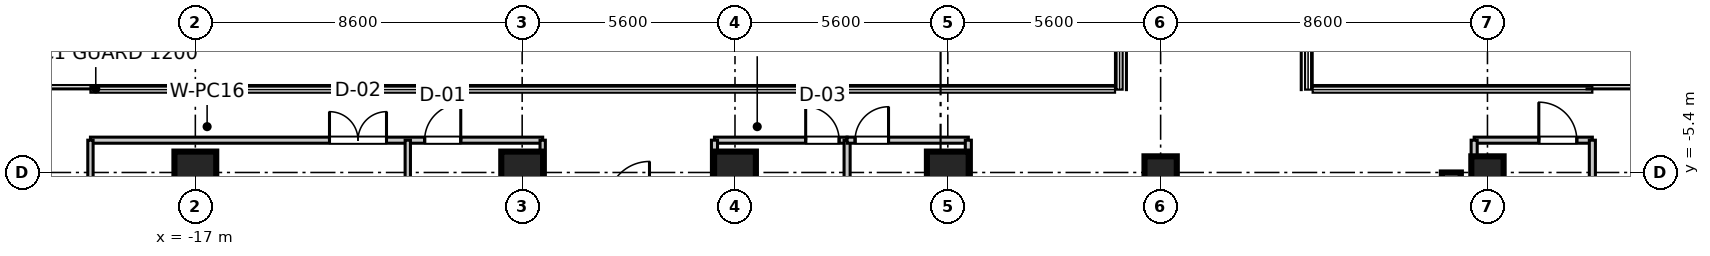
"""IFC4 building model, lengths in metres.
Left out: names, types, materials, properties, quantities, classifications, styles, units other than length and angle.
Written with IfcOpenShell. Run it as: python <this file> out.ifc"""

import sys

from ifc_helpers import new_model, si_unit, direction, frame, frame_2d, origin, origin_2d, place, context, subcontext, project, spatial, rectangle, extrude, source, transform, mapped, element, fill, save


model = new_model("IFC4")
c1 = context("Model", 3, precision=1e-05, world=origin(), true_north=direction((0.0, 1.0)))
c2 = subcontext(c1, "Body", "Model", "MODEL_VIEW")
j1 = project(units=[si_unit("LENGTHUNIT", "METRE"), si_unit("PLANEANGLEUNIT", "RADIAN")], contexts=[c1])
p1 = place(None, origin())
s1 = spatial("IfcSite", under=j1, at=p1, CompositionType="ELEMENT")
p2 = place(p1, origin())
s2 = spatial("IfcBuilding", under=s1, at=p2, CompositionType="ELEMENT")
p3 = place(p2, frame((0.0, 0.0, 178.2)))
s3 = spatial("IfcBuildingStorey", under=s2, at=p3, CompositionType="ELEMENT", Elevation=178.2)
m1 = source(origin(), c2, "Body", "SweptSolid", [
    extrude(rectangle(XDim=1.1, YDim=1.1, at=origin_2d()), origin(), (0.0, 0.0, 1.0), 3.605),
])
for number, where, z_axis, x_axis in (
    (1, (-17.0, -5.4, 0.0), (0.0, 0.0, 1.0), (1.0, 0.0, 0.0)),
    (2, (-8.4, -5.4, 0.0), (0.0, 0.0, 1.0), (1.0, 0.0, 0.0)),
    (3, (-2.8, -5.4, 0.0), (0.0, 0.0, 1.0), (1.0, 0.0, 0.0)),
    (4, (2.8, -5.4, 0.0), (0.0, 0.0, 1.0), (1.0, 0.0, 0.0)),
):
    element("IfcColumn", number, at=place(p3, frame(where, z_axis=z_axis, x_axis=x_axis)), inside=s3, PredefinedType="COLUMN", context=c2, shape_type="MappedRepresentation", body=[
        mapped(m1, transform((0.0, 0.0, 0.0), scale=1.0)),
    ])
m2 = source(origin(), c2, "Body", "SweptSolid", [
    extrude(rectangle(XDim=0.85, YDim=0.85, at=origin_2d()), origin(), (0.0, 0.0, 1.0), 3.605),
])
for number, where, z_axis, x_axis in (
    (5, (8.4, -5.4, 0.0), (0.0, 0.0, 1.0), (1.0, 0.0, 0.0)),
    (6, (17.0, -5.4, 0.0), (0.0, 0.0, 1.0), (1.0, 0.0, 0.0)),
):
    element("IfcColumn", number, at=place(p3, frame(where, z_axis=z_axis, x_axis=x_axis)), inside=s3, PredefinedType="PILASTER", context=c2, shape_type="MappedRepresentation", body=[
        mapped(m2, transform((0.0, 0.0, 0.0), scale=1.0)),
    ])
m3 = source(origin(), c2, "Body", "SweptSolid", [
    extrude(rectangle(XDim=11.6, YDim=0.5, at=frame_2d((5.8, 0.0))), origin(), (0.0, 0.0, 1.0), 3.39),
])
p4 = place(p3, frame((16.05, -17.0, 0.0), z_axis=(0.0, 0.0, 1.0), x_axis=(0.0, 1.0, 0.0)))
e7 = element("IfcWall", 7, at=p4, inside=s3, PredefinedType="SHEAR", context=c2, shape_type="MappedRepresentation", body=[
    mapped(m3, transform((0.0, 0.0, 0.0), scale=1.0)),
])
m4 = source(origin(), c2, "Body", "SweptSolid", [
    extrude(rectangle(XDim=3.11, YDim=0.16, at=frame_2d((1.555, 0.0))), origin(), (0.0, 0.0, 1.0), 2.73),
])
p5 = place(p3, frame((16.65, -4.55, 0.0), z_axis=(0.0, 0.0, 1.0), x_axis=(1.0, 0.0, 0.0)))
e8 = element("IfcWall", 8, at=p5, inside=s3, PredefinedType="PARTITIONING", context=c2, shape_type="MappedRepresentation", body=[
    mapped(m4, transform((0.0, 0.0, 0.0), scale=1.0)),
])
p6 = place(p5, frame((1.701, 0.0, 0.0)))
e9 = element("IfcOpeningElement", 9, at=p6, cuts=e8, PredefinedType="OPENING", context=c2, shape_type="SweptSolid", body=[
    extrude(rectangle(XDim=1.0, YDim=2.1, at=frame_2d((0.5, 1.05))), frame((0.0, 0.09, 0.0), z_axis=(0.0, -1.0, 0.0), x_axis=(1.0, 0.0, 0.0)), (0.0, 0.0, 1.0), 0.18),
])
m5 = source(origin(), c2, "Body", "SweptSolid", [
    extrude(rectangle(XDim=17.95, YDim=0.16, at=frame_2d((8.975, 0.0))), origin(), (0.0, 0.0, 1.0), 2.73),
])
p7 = place(p3, frame((16.65, -22.5, 0.0), z_axis=(0.0, 0.0, 1.0), x_axis=(0.0, 1.0, 0.0)))
e10 = element("IfcWall", 10, at=p7, inside=s3, PredefinedType="PARTITIONING", context=c2, shape_type="MappedRepresentation", body=[
    mapped(m5, transform((0.0, 0.0, 0.0), scale=1.0)),
])
m6 = source(origin(), c2, "Body", "SweptSolid", [
    extrude(rectangle(XDim=16.53, YDim=0.16, at=frame_2d((8.265, 0.0))), origin(), (0.0, 0.0, 1.0), 2.73),
])
p8 = place(p3, frame((19.76, -21.08, 0.0), z_axis=(0.0, 0.0, 1.0), x_axis=(0.0, 1.0, 0.0)))
e11 = element("IfcWall", 11, at=p8, inside=s3, PredefinedType="PARTITIONING", context=c2, shape_type="MappedRepresentation", body=[
    mapped(m6, transform((0.0, 0.0, 0.0), scale=1.0)),
])
m7 = source(origin(), c2, "Body", "SweptSolid", [
    extrude(rectangle(XDim=11.9, YDim=0.16, at=frame_2d((5.95, 0.0))), origin(), (0.0, 0.0, 1.0), 2.73),
])
p9 = place(p3, frame((-19.76, -4.55, 0.0), z_axis=(0.0, 0.0, 1.0), x_axis=(1.0, 0.0, 0.0)))
e12 = element("IfcWall", 12, at=p9, inside=s3, PredefinedType="PARTITIONING", context=c2, shape_type="MappedRepresentation", body=[
    mapped(m7, transform((0.0, 0.0, 0.0), scale=1.0)),
])
p10 = place(p9, frame((6.29, 0.0, 0.0)))
e13 = element("IfcOpeningElement", 13, at=p10, cuts=e12, PredefinedType="OPENING", context=c2, shape_type="SweptSolid", body=[
    extrude(rectangle(XDim=1.5, YDim=2.15, at=frame_2d((0.75, 1.075))), frame((0.0, 0.09, 0.0), z_axis=(0.0, -1.0, 0.0), x_axis=(1.0, 0.0, 0.0)), (0.0, 0.0, 1.0), 0.18),
])
p11 = place(p9, frame((8.794, 0.0, 0.0)))
e14 = element("IfcOpeningElement", 14, at=p11, cuts=e12, PredefinedType="OPENING", context=c2, shape_type="SweptSolid", body=[
    extrude(rectangle(XDim=0.95, YDim=2.1, at=frame_2d((0.475, 1.05))), frame((0.0, 0.09, 0.0), z_axis=(0.0, -1.0, 0.0), x_axis=(1.0, 0.0, 0.0)), (0.0, 0.0, 1.0), 0.18),
])
m8 = source(origin(), c2, "Body", "SweptSolid", [
    extrude(rectangle(XDim=16.53, YDim=0.14, at=frame_2d((8.265, 0.0))), origin(), (0.0, 0.0, 1.0), 2.73),
])
p12 = place(p3, frame((-19.76, -21.08, 0.0), z_axis=(0.0, 0.0, 1.0), x_axis=(0.0, 1.0, 0.0)))
e15 = element("IfcWall", 15, at=p12, inside=s3, PredefinedType="PARTITIONING", context=c2, shape_type="MappedRepresentation", body=[
    mapped(m8, transform((0.0, 0.0, 0.0), scale=1.0)),
])
m9 = source(origin(), c2, "Body", "SweptSolid", [
    extrude(rectangle(XDim=17.95, YDim=0.14, at=frame_2d((8.975, 0.0))), origin(), (0.0, 0.0, 1.0), 2.73),
])
for number, where, z_axis, x_axis in (
    (16, (-7.86, -22.5, 0.0), (0.0, 0.0, 1.0), (0.0, 1.0, 0.0)),
    (17, (-11.41, -22.5, 0.0), (0.0, 0.0, 1.0), (0.0, 1.0, 0.0)),
):
    element("IfcWall", number, at=place(p3, frame(where, z_axis=z_axis, x_axis=x_axis)), inside=s3, PredefinedType="PARTITIONING", context=c2, shape_type="MappedRepresentation", body=[
        mapped(m9, transform((0.0, 0.0, 0.0), scale=1.0)),
    ])
m10 = source(origin(), c2, "Body", "SweptSolid", [
    extrude(rectangle(XDim=3.49, YDim=0.16, at=frame_2d((1.745, 0.0))), origin(), (0.0, 0.0, 1.0), 2.73),
])
p13 = place(p3, frame((-3.34, -4.55, 0.0), z_axis=(0.0, 0.0, 1.0), x_axis=(1.0, 0.0, 0.0)))
e18 = element("IfcWall", 18, at=p13, inside=s3, PredefinedType="PARTITIONING", context=c2, shape_type="MappedRepresentation", body=[
    mapped(m10, transform((0.0, 0.0, 0.0), scale=1.0)),
])
p14 = place(p13, frame((2.4, 0.0, 0.0)))
e19 = element("IfcOpeningElement", 19, at=p14, cuts=e18, PredefinedType="OPENING", context=c2, shape_type="SweptSolid", body=[
    extrude(rectangle(XDim=0.88, YDim=2.1, at=frame_2d((0.44, 1.05))), frame((0.0, 0.09, 0.0), z_axis=(0.0, -1.0, 0.0), x_axis=(1.0, 0.0, 0.0)), (0.0, 0.0, 1.0), 0.18),
])
for number, where, z_axis, x_axis in (
    (20, (-3.34, -22.5, 0.0), (0.0, 0.0, 1.0), (0.0, 1.0, 0.0)),
    (21, (0.15, -22.5, 0.0), (0.0, 0.0, 1.0), (0.0, 1.0, 0.0)),
):
    element("IfcWall", number, at=place(p3, frame(where, z_axis=z_axis, x_axis=x_axis)), inside=s3, PredefinedType="PARTITIONING", context=c2, shape_type="MappedRepresentation", body=[
        mapped(m5, transform((0.0, 0.0, 0.0), scale=1.0)),
    ])
m11 = source(origin(), c2, "Body", "SweptSolid", [
    extrude(rectangle(XDim=3.19, YDim=0.16, at=frame_2d((1.595, 0.0))), origin(), (0.0, 0.0, 1.0), 2.73),
])
p15 = place(p3, frame((0.15, -4.55, 0.0), z_axis=(0.0, 0.0, 1.0), x_axis=(1.0, 0.0, 0.0)))
e22 = element("IfcWall", 22, at=p15, inside=s3, PredefinedType="PARTITIONING", context=c2, shape_type="MappedRepresentation", body=[
    mapped(m11, transform((0.0, 0.0, 0.0), scale=1.0)),
])
p16 = place(p15, frame((0.21, 0.0, 0.0)))
e23 = element("IfcOpeningElement", 23, at=p16, cuts=e22, PredefinedType="OPENING", context=c2, shape_type="SweptSolid", body=[
    extrude(rectangle(XDim=0.88, YDim=2.1, at=frame_2d((0.44, 1.05))), frame((0.0, 0.09, 0.0), z_axis=(0.0, -1.0, 0.0), x_axis=(1.0, 0.0, 0.0)), (0.0, 0.0, 1.0), 0.18),
])
p17 = place(p3, frame((3.34, -22.5, 0.0), z_axis=(0.0, 0.0, 1.0), x_axis=(0.0, 1.0, 0.0)))
e24 = element("IfcWall", 24, at=p17, inside=s3, PredefinedType="PARTITIONING", context=c2, shape_type="MappedRepresentation", body=[
    mapped(m5, transform((0.0, 0.0, 0.0), scale=1.0)),
])
m12 = source(origin(), c2, "Body", "SweptSolid", [
    extrude(rectangle(XDim=1.0, YDim=2.1, at=frame_2d((0.5, 1.05))), frame((0.0, 0.025, 0.0), z_axis=(0.0, -1.0, 0.0), x_axis=(1.0, 0.0, 0.0)), (0.0, 0.0, 1.0), 0.05),
])
p18 = place(p6, frame((1.0, 0.0, 0.0), z_axis=(0.0, 0.0, 1.0), x_axis=(-1.0, 0.0, 0.0)))
e25 = element("IfcDoor", 25, at=p18, inside=s3, OperationType="SINGLE_SWING_LEFT", PredefinedType="DOOR", context=c2, shape_type="MappedRepresentation", body=[
    mapped(m12, transform((0.0, 0.0, 0.0), scale=1.0)),
])
fill(e9, e25)
m13 = source(origin(), c2, "Body", "SweptSolid", [
    extrude(rectangle(XDim=1.5, YDim=2.15, at=frame_2d((0.75, 1.075))), frame((0.0, 0.025, 0.0), z_axis=(0.0, -1.0, 0.0), x_axis=(1.0, 0.0, 0.0)), (0.0, 0.0, 1.0), 0.05),
])
p19 = place(p10, frame((1.5, 0.0, 0.0), z_axis=(0.0, 0.0, 1.0), x_axis=(-1.0, 0.0, 0.0)))
e26 = element("IfcDoor", 26, at=p19, inside=s3, OperationType="DOUBLE_DOOR_SINGLE_SWING", PredefinedType="DOOR", context=c2, shape_type="MappedRepresentation", body=[
    mapped(m13, transform((0.0, 0.0, 0.0), scale=1.0)),
])
fill(e13, e26)
m14 = source(origin(), c2, "Body", "SweptSolid", [
    extrude(rectangle(XDim=0.95, YDim=2.1, at=frame_2d((0.475, 1.05))), frame((0.0, 0.025, 0.0), z_axis=(0.0, -1.0, 0.0), x_axis=(1.0, 0.0, 0.0)), (0.0, 0.0, 1.0), 0.05),
])
p20 = place(p11, frame((0.95, 0.0, 0.0), z_axis=(0.0, 0.0, 1.0), x_axis=(-1.0, 0.0, 0.0)))
e27 = element("IfcDoor", 27, at=p20, inside=s3, OperationType="SINGLE_SWING_RIGHT", PredefinedType="DOOR", context=c2, shape_type="MappedRepresentation", body=[
    mapped(m14, transform((0.0, 0.0, 0.0), scale=1.0)),
])
fill(e14, e27)
m15 = source(origin(), c2, "Body", "SweptSolid", [
    extrude(rectangle(XDim=0.88, YDim=2.1, at=frame_2d((0.44, 1.05))), frame((0.0, 0.025, 0.0), z_axis=(0.0, -1.0, 0.0), x_axis=(1.0, 0.0, 0.0)), (0.0, 0.0, 1.0), 0.05),
])
p21 = place(p14, frame((0.88, 0.0, 0.0), z_axis=(0.0, 0.0, 1.0), x_axis=(-1.0, 0.0, 0.0)))
e28 = element("IfcDoor", 28, at=p21, inside=s3, OperationType="SINGLE_SWING_LEFT", PredefinedType="DOOR", context=c2, shape_type="MappedRepresentation", body=[
    mapped(m15, transform((0.0, 0.0, 0.0), scale=1.0)),
])
fill(e19, e28)
p22 = place(p16, frame((0.88, 0.0, 0.0), z_axis=(0.0, 0.0, 1.0), x_axis=(-1.0, 0.0, 0.0)))
e29 = element("IfcDoor", 29, at=p22, inside=s3, OperationType="SINGLE_SWING_RIGHT", PredefinedType="DOOR", context=c2, shape_type="MappedRepresentation", body=[
    mapped(m15, transform((0.0, 0.0, 0.0), scale=1.0)),
])
fill(e23, e29)
save(model, sys.argv[1])
